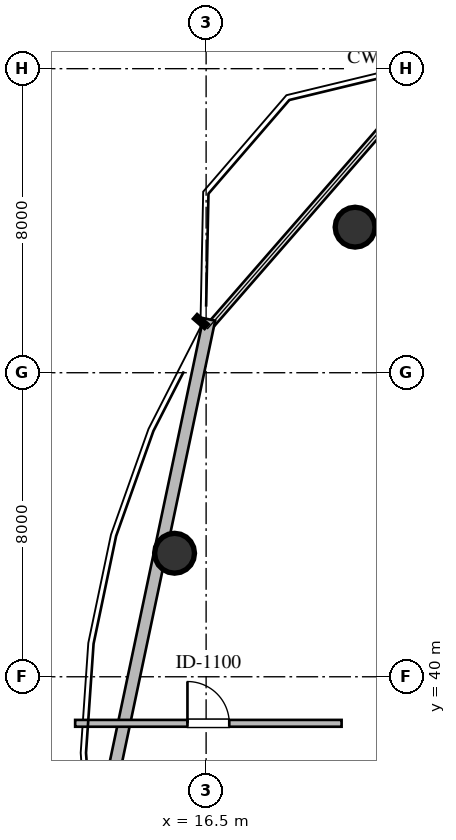
"""IFC4 building model, lengths in metres.
Left out: names, types, materials, properties, quantities, classifications, styles, units other than length and angle.
Written with IfcOpenShell. Run it as: python <this file> out.ifc"""

import sys

from ifc_helpers import new_model, si_unit, direction, frame, frame_2d, origin, origin_2d, place, context, subcontext, project, spatial, rectangle, circle, extrude, element, fill, save


model = new_model("IFC4")
c1 = context("Model", 3, precision=1e-05, world=origin(), true_north=direction((0.0, 1.0)))
c2 = subcontext(c1, "Body", "Model", "MODEL_VIEW")
j1 = project(units=[si_unit("LENGTHUNIT", "METRE"), si_unit("PLANEANGLEUNIT", "RADIAN")], contexts=[c1])
p1 = place(None, origin())
s1 = spatial("IfcSite", under=j1, at=p1, CompositionType="ELEMENT")
p2 = place(p1, origin())
s2 = spatial("IfcBuilding", under=s1, at=p2, CompositionType="ELEMENT")
p3 = place(p2, frame((0.0, 0.0, 231.6)))
s3 = spatial("IfcBuildingStorey", under=s2, at=p3, CompositionType="ELEMENT", Elevation=231.6)
for number, where, z_axis, x_axis in (
    (1, (20.42, 51.83, 0.0), (0.0, 0.0, 1.0), (1.0, 0.0, 0.0)),
    (2, (15.67, 43.25, 0.0), (0.0, 0.0, 1.0), (1.0, 0.0, 0.0)),
):
    element("IfcColumn", number, at=place(p3, frame(where, z_axis=z_axis, x_axis=x_axis)), inside=s3, PredefinedType="COLUMN", context=c2, shape_type="SweptSolid", body=[
        extrude(circle(Radius=0.525, at=origin_2d()), origin(), (0.0, 0.0, 1.0), 3.6),
    ])
p4 = place(p3, frame((13.525, 34.903, 0.0), z_axis=(0.0, 0.0, 1.0), x_axis=(0.206301080321, 0.978488561128, 0.0)))
e3 = element("IfcWall", 3, at=p4, inside=s3, PredefinedType="STANDARD", context=c2, shape_type="SweptSolid", body=[
    extrude(rectangle(XDim=14.819, YDim=0.32, at=frame_2d((7.409, 0.0))), origin(), (0.0, 0.0, 1.0), 2.817),
])
p5 = place(p3, frame((13.054, 38.775, 0.0), z_axis=(0.0, 0.0, 1.0), x_axis=(1.0, 0.0, 0.0)))
e4 = element("IfcWall", 4, at=p5, inside=s3, PredefinedType="PARTITIONING", context=c2, shape_type="SweptSolid", body=[
    extrude(rectangle(XDim=7.011, YDim=0.18, at=frame_2d((3.505, 0.0))), origin(), (0.0, 0.0, 1.0), 3.36),
])
p6 = place(p5, frame((2.955, 0.0, 0.0)))
e5 = element("IfcOpeningElement", 5, at=p6, cuts=e4, PredefinedType="OPENING", context=c2, shape_type="SweptSolid", body=[
    extrude(rectangle(XDim=1.1, YDim=2.1, at=frame_2d((0.55, 1.05))), frame((0.0, 0.1, 0.0), z_axis=(0.0, -1.0, 0.0), x_axis=(1.0, 0.0, 0.0)), (0.0, 0.0, 1.0), 0.2),
])
p7 = place(p6, origin())
e6 = element("IfcDoor", 6, at=p7, inside=s3, OperationType="SINGLE_SWING_LEFT", PredefinedType="DOOR", context=c2, shape_type="SweptSolid", body=[
    extrude(rectangle(XDim=1.1, YDim=2.1, at=frame_2d((0.55, 1.05))), frame((0.0, 0.025, 0.0), z_axis=(0.0, -1.0, 0.0), x_axis=(1.0, 0.0, 0.0)), (0.0, 0.0, 1.0), 0.05),
])
fill(e5, e6)
save(model, sys.argv[1])
